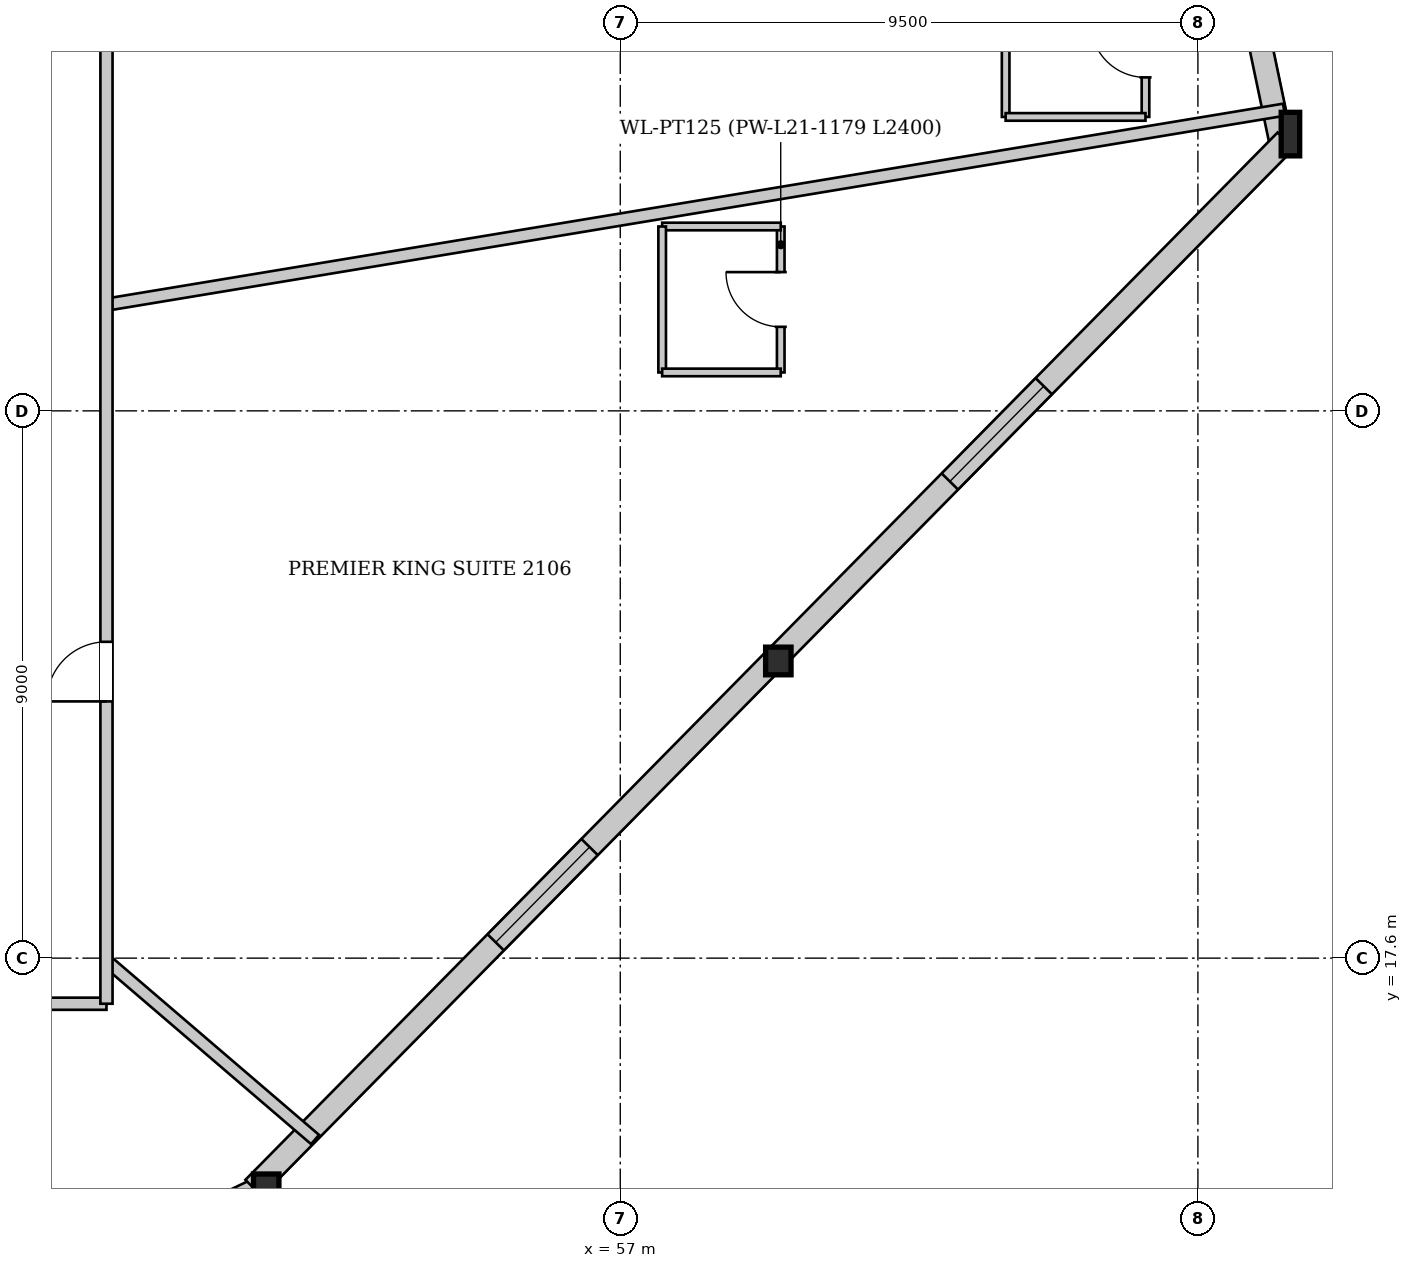
"""IFC4 building model, lengths in metres.
Left out: names, types, materials, properties, quantities, classifications, styles, units other than length and angle.
Written with IfcOpenShell. Run it as: python <this file> out.ifc"""

import sys

from ifc_helpers import new_model, si_unit, direction, frame, frame_2d, origin, origin_2d, place, context, subcontext, project, spatial, rectangle, i_section, extrude, source, transform, mapped, element, fill, save


model = new_model("IFC4")
c1 = context("Model", 3, precision=1e-05, world=origin(), true_north=direction((0.0, 1.0)))
c2 = subcontext(c1, "Body", "Model", "MODEL_VIEW")
j1 = project(units=[si_unit("LENGTHUNIT", "METRE"), si_unit("PLANEANGLEUNIT", "RADIAN")], contexts=[c1])
p1 = place(None, origin())
s1 = spatial("IfcSite", under=j1, at=p1, CompositionType="ELEMENT")
p2 = place(p1, origin())
s2 = spatial("IfcBuilding", under=s1, at=p2, CompositionType="ELEMENT")
p3 = place(p2, frame((0.0, 0.0, 84.4)))
s3 = spatial("IfcBuildingStorey", under=s2, at=p3, CompositionType="ELEMENT", Elevation=84.4)
m1 = source(origin(), c2, "Body", "SweptSolid", [
    extrude(i_section(OverallWidth=0.304, OverallDepth=0.716, WebThickness=0.021, FlangeThickness=0.04, at=origin_2d()), origin(), (0.0, 0.0, 1.0), 3.421),
])
p4 = place(p3, frame((68.081, 30.911, 0.0), z_axis=(-0.034755185422, 0.140376693481, 0.989487979216), x_axis=(-0.970691537398, -0.240328814801, 0.0)))
e1 = element("IfcColumn", 1, at=p4, inside=s3, PredefinedType="COLUMN", context=c2, shape_type="MappedRepresentation", body=[
    mapped(m1, transform((0.0, 0.0, 0.0), x_axis=(1.0, 0.0, 0.0), y_axis=(0.0, 1.0, 0.0), z_axis=(0.0, 0.0, 1.0), scale=1.0)),
])
m2 = source(origin(), c2, "Body", "SweptSolid", [
    extrude(i_section(OverallWidth=0.418, OverallDepth=0.455, WebThickness=0.038, FlangeThickness=0.059, at=origin_2d()), origin(), (0.0, 0.0, 1.0), 3.399),
])
p5 = place(p3, frame((51.105, 13.687, 0.0), z_axis=(0.042450582005, 0.079873176293, 0.995900709808), x_axis=(-0.883033453869, 0.469310046076, 0.0)))
e2 = element("IfcColumn", 2, at=p5, inside=s3, PredefinedType="COLUMN", context=c2, shape_type="MappedRepresentation", body=[
    mapped(m2, transform((0.0, 0.0, 0.0), x_axis=(1.0, 0.0, 0.0), y_axis=(0.0, 1.0, 0.0), z_axis=(0.0, 0.0, 1.0), scale=1.0)),
])
m3 = source(origin(), c2, "Body", "SweptSolid", [
    extrude(i_section(OverallWidth=0.418, OverallDepth=0.455, WebThickness=0.038, FlangeThickness=0.059, at=origin_2d()), origin(), (0.0, 0.0, 1.0), 3.406),
])
p6 = place(p3, frame((59.593, 22.299, 0.0), z_axis=(0.003727502518, 0.110391420713, 0.993881200123), x_axis=(-0.999430407751, 0.033747000781, 0.0)))
e3 = element("IfcColumn", 3, at=p6, inside=s3, PredefinedType="COLUMN", context=c2, shape_type="MappedRepresentation", body=[
    mapped(m3, transform((0.0, 0.0, 0.0), x_axis=(1.0, 0.0, 0.0), y_axis=(0.0, 1.0, 0.0), z_axis=(0.0, 0.0, 1.0), scale=1.0)),
])
p7 = place(p3, frame((51.036, 13.831, 0.0), z_axis=(0.0, 0.0, 1.0), x_axis=(-0.901204126569, -0.433394880283, 0.0)))
e4 = element("IfcWall", 4, at=p7, inside=s3, PredefinedType="SOLIDWALL", context=c2, shape_type="SweptSolid", body=[
    extrude(rectangle(XDim=24.184, YDim=0.32, at=frame_2d((12.092, 0.0))), origin(), (0.0, 0.0, 1.0), 2.692),
])
p8 = place(p7, frame((7.189, 0.0, 0.0)))
e5 = element("IfcOpeningElement", 5, at=p8, cuts=e4, PredefinedType="OPENING", context=c2, shape_type="SweptSolid", body=[
    extrude(rectangle(XDim=1.1, YDim=2.3, at=frame_2d((0.55, 1.15))), frame((0.0, 0.17, 0.0), z_axis=(0.0, -1.0, 0.0), x_axis=(1.0, 0.0, 0.0)), (0.0, 0.0, 1.0), 0.34),
])
p9 = place(p7, frame((17.746, 0.0, 0.372)))
e6 = element("IfcOpeningElement", 6, at=p9, cuts=e4, PredefinedType="OPENING", context=c2, shape_type="SweptSolid", body=[
    extrude(rectangle(XDim=1.8, YDim=2.2, at=frame_2d((0.9, 1.1))), frame((0.0, 0.17, 0.0), z_axis=(0.0, -1.0, 0.0), x_axis=(1.0, 0.0, 0.0)), (0.0, 0.0, 1.0), 0.34),
])
p10 = place(p3, frame((67.023, 35.03, 0.0), z_axis=(0.0, 0.0, 1.0), x_axis=(0.205390638941, -0.978680073076, 0.0)))
e7 = element("IfcWall", 7, at=p10, inside=s3, PredefinedType="SOLIDWALL", context=c2, shape_type="SweptSolid", body=[
    extrude(rectangle(XDim=4.248, YDim=0.38, at=frame_2d((2.124, 0.0))), origin(), (0.0, 0.0, 1.0), 2.692),
])
p11 = place(p3, frame((67.946, 31.045, 0.0), z_axis=(0.0, 0.0, 1.0), x_axis=(-0.701949653056, -0.712226568288, 0.0)))
e8 = element("IfcWall", 8, at=p11, inside=s3, PredefinedType="SOLIDWALL", context=c2, shape_type="SweptSolid", body=[
    extrude(rectangle(XDim=24.184, YDim=0.38, at=frame_2d((12.092, 0.0))), origin(), (0.0, 0.0, 1.0), 2.692),
])
p12 = place(p11, frame((5.671, 0.0, 0.322)))
e9 = element("IfcOpeningElement", 9, at=p12, cuts=e8, PredefinedType="OPENING", context=c2, shape_type="SweptSolid", body=[
    extrude(rectangle(XDim=2.2, YDim=2.25, at=frame_2d((1.1, 1.125))), frame((0.0, 0.2, 0.0), z_axis=(0.0, -1.0, 0.0), x_axis=(1.0, 0.0, 0.0)), (0.0, 0.0, 1.0), 0.4),
])
p13 = place(p11, frame((16.312, 0.0, 0.322)))
e10 = element("IfcOpeningElement", 10, at=p13, cuts=e8, PredefinedType="OPENING", context=c2, shape_type="SweptSolid", body=[
    extrude(rectangle(XDim=2.2, YDim=2.25, at=frame_2d((1.1, 1.125))), frame((0.0, 0.2, 0.0), z_axis=(0.0, -1.0, 0.0), x_axis=(1.0, 0.0, 0.0)), (0.0, 0.0, 1.0), 0.4),
])
p14 = place(p3, frame((48.55, 17.558, 0.0), z_axis=(0.0, 0.0, 1.0), x_axis=(0.75925278781, -0.650795823744, 0.0)))
e11 = element("IfcWall", 11, at=p14, inside=s3, PredefinedType="PARTITIONING", context=c2, shape_type="SweptSolid", body=[
    extrude(rectangle(XDim=4.518, YDim=0.2, at=frame_2d((2.259, 0.0))), origin(), (0.0, 0.0, 1.0), 3.3),
])
p15 = place(p3, frame((48.55, 28.346, 0.0), z_axis=(0.0, 0.0, 1.0), x_axis=(0.986571835932, 0.163327929471, 0.0)))
e12 = element("IfcWall", 12, at=p15, inside=s3, PredefinedType="PARTITIONING", context=c2, shape_type="SweptSolid", body=[
    extrude(rectangle(XDim=19.63, YDim=0.2, at=frame_2d((9.815, 0.0))), origin(), (0.0, 0.0, 1.0), 2.795),
])
p16 = place(p3, frame((59.639, 27.232, 0.0), z_axis=(0.0, 0.0, 1.0), x_axis=(0.0, 1.0, 0.0)))
e13 = element("IfcWall", 13, at=p16, inside=s3, PredefinedType="PARTITIONING", context=c2, shape_type="SweptSolid", body=[
    extrude(rectangle(XDim=2.4, YDim=0.125, at=frame_2d((1.2, 0.0))), origin(), (0.0, 0.0, 1.0), 3.3),
])
p17 = place(p16, frame((0.75, 0.0, 0.0)))
e14 = element("IfcOpeningElement", 14, at=p17, cuts=e13, PredefinedType="OPENING", context=c2, shape_type="SweptSolid", body=[
    extrude(rectangle(XDim=0.9, YDim=2.1, at=frame_2d((0.45, 1.05))), frame((0.0, 0.073, 0.0), z_axis=(0.0, -1.0, 0.0), x_axis=(1.0, 0.0, 0.0)), (0.0, 0.0, 1.0), 0.145),
])
p18 = place(p3, frame((59.639, 29.632, 0.0), z_axis=(0.0, 0.0, 1.0), x_axis=(-1.0, 0.0, 0.0)))
e15 = element("IfcWall", 15, at=p18, inside=s3, PredefinedType="PARTITIONING", context=c2, shape_type="SweptSolid", body=[
    extrude(rectangle(XDim=1.95, YDim=0.125, at=frame_2d((0.975, 0.0))), origin(), (0.0, 0.0, 1.0), 2.795),
])
p19 = place(p3, frame((57.689, 29.632, 0.0), z_axis=(0.0, 0.0, 1.0), x_axis=(0.0, -1.0, 0.0)))
e16 = element("IfcWall", 16, at=p19, inside=s3, PredefinedType="PARTITIONING", context=c2, shape_type="SweptSolid", body=[
    extrude(rectangle(XDim=2.4, YDim=0.125, at=frame_2d((1.2, 0.0))), origin(), (0.0, 0.0, 1.0), 3.3),
])
p20 = place(p3, frame((57.689, 27.232, 0.0), z_axis=(0.0, 0.0, 1.0), x_axis=(1.0, 0.0, 0.0)))
e17 = element("IfcWall", 17, at=p20, inside=s3, PredefinedType="PARTITIONING", context=c2, shape_type="SweptSolid", body=[
    extrude(rectangle(XDim=1.95, YDim=0.125, at=frame_2d((0.975, 0.0))), origin(), (0.0, 0.0, 1.0), 3.3),
])
p21 = place(p3, frame((65.638, 31.434, 0.0), z_axis=(0.0, 0.0, 1.0), x_axis=(0.0, 1.0, 0.0)))
e18 = element("IfcWall", 18, at=p21, inside=s3, PredefinedType="PARTITIONING", context=c2, shape_type="SweptSolid", body=[
    extrude(rectangle(XDim=2.2, YDim=0.125, at=frame_2d((1.1, 0.0))), origin(), (0.0, 0.0, 1.0), 3.3),
])
p22 = place(p21, frame((0.65, 0.0, 0.0)))
e19 = element("IfcOpeningElement", 19, at=p22, cuts=e18, PredefinedType="OPENING", context=c2, shape_type="SweptSolid", body=[
    extrude(rectangle(XDim=0.9, YDim=2.1, at=frame_2d((0.45, 1.05))), frame((0.0, 0.073, 0.0), z_axis=(0.0, -1.0, 0.0), x_axis=(1.0, 0.0, 0.0)), (0.0, 0.0, 1.0), 0.145),
])
p23 = place(p3, frame((63.338, 33.634, 0.0), z_axis=(0.0, 0.0, 1.0), x_axis=(0.0, -1.0, 0.0)))
e20 = element("IfcWall", 20, at=p23, inside=s3, PredefinedType="PARTITIONING", context=c2, shape_type="SweptSolid", body=[
    extrude(rectangle(XDim=2.2, YDim=0.125, at=frame_2d((1.1, 0.0))), origin(), (0.0, 0.0, 1.0), 3.3),
])
p24 = place(p3, frame((63.338, 31.434, 0.0), z_axis=(0.0, 0.0, 1.0), x_axis=(1.0, 0.0, 0.0)))
e21 = element("IfcWall", 21, at=p24, inside=s3, PredefinedType="PARTITIONING", context=c2, shape_type="SweptSolid", body=[
    extrude(rectangle(XDim=2.3, YDim=0.125, at=frame_2d((1.15, 0.0))), origin(), (0.0, 0.0, 1.0), 3.3),
])
p25 = place(p3, frame((27.45, 16.85, 0.0), z_axis=(0.0, 0.0, 1.0), x_axis=(1.0, 0.0, 0.0)))
e22 = element("IfcWall", 22, at=p25, inside=s3, PredefinedType="PARTITIONING", context=c2, shape_type="SweptSolid", body=[
    extrude(rectangle(XDim=21.1, YDim=0.2, at=frame_2d((10.55, 0.0))), origin(), (0.0, 0.0, 1.0), 3.3),
])
p26 = place(p25, frame((1.399, 0.0, 0.0)))
e23 = element("IfcOpeningElement", 23, at=p26, cuts=e22, PredefinedType="OPENING", context=c2, shape_type="SweptSolid", body=[
    extrude(rectangle(XDim=0.98, YDim=2.15, at=frame_2d((0.49, 1.075))), frame((0.0, 0.11, 0.0), z_axis=(0.0, -1.0, 0.0), x_axis=(1.0, 0.0, 0.0)), (0.0, 0.0, 1.0), 0.22),
])
p27 = place(p25, frame((11.767, 0.0, 0.0)))
e24 = element("IfcOpeningElement", 24, at=p27, cuts=e22, PredefinedType="OPENING", context=c2, shape_type="SweptSolid", body=[
    extrude(rectangle(XDim=0.98, YDim=2.15, at=frame_2d((0.49, 1.075))), frame((0.0, 0.11, 0.0), z_axis=(0.0, -1.0, 0.0), x_axis=(1.0, 0.0, 0.0)), (0.0, 0.0, 1.0), 0.22),
])
p28 = place(p3, frame((48.55, 16.85, 0.0), z_axis=(0.0, 0.0, 1.0), x_axis=(0.0, 1.0, 0.0)))
e25 = element("IfcWall", 25, at=p28, inside=s3, PredefinedType="PARTITIONING", context=c2, shape_type="SweptSolid", body=[
    extrude(rectangle(XDim=19.5, YDim=0.2, at=frame_2d((9.75, 0.0))), origin(), (0.0, 0.0, 1.0), 3.3),
])
p29 = place(p28, frame((4.972, 0.0, 0.0)))
e26 = element("IfcOpeningElement", 26, at=p29, cuts=e25, PredefinedType="OPENING", context=c2, shape_type="SweptSolid", body=[
    extrude(rectangle(XDim=0.98, YDim=2.15, at=frame_2d((0.49, 1.075))), frame((0.0, 0.11, 0.0), z_axis=(0.0, -1.0, 0.0), x_axis=(1.0, 0.0, 0.0)), (0.0, 0.0, 1.0), 0.22),
])
m4 = source(origin(), c2, "Body", "SweptSolid", [
    extrude(rectangle(XDim=2.2, YDim=2.25, at=frame_2d((1.1, 1.125))), frame((0.0, 0.03, 0.0), z_axis=(0.0, -1.0, 0.0), x_axis=(1.0, 0.0, 0.0)), (0.0, 0.0, 1.0), 0.06),
])
p30 = place(p12, origin())
e27 = element("IfcWindow", 27, at=p30, inside=s3, PartitioningType="SINGLE_PANEL", PredefinedType="WINDOW", context=c2, shape_type="MappedRepresentation", body=[
    mapped(m4, transform((0.0, 0.0, 0.0), x_axis=(1.0, 0.0, 0.0), y_axis=(0.0, 1.0, 0.0), z_axis=(0.0, 0.0, 1.0), scale=1.0)),
])
fill(e9, e27)
p31 = place(p13, origin())
e28 = element("IfcWindow", 28, at=p31, inside=s3, PartitioningType="SINGLE_PANEL", PredefinedType="WINDOW", context=c2, shape_type="MappedRepresentation", body=[
    mapped(m4, transform((0.0, 0.0, 0.0), x_axis=(1.0, 0.0, 0.0), y_axis=(0.0, 1.0, 0.0), z_axis=(0.0, 0.0, 1.0), scale=1.0)),
])
fill(e10, e28)
m5 = source(origin(), c2, "Body", "SweptSolid", [
    extrude(rectangle(XDim=0.9, YDim=2.1, at=frame_2d((0.45, 1.05))), frame((0.0, 0.025, 0.0), z_axis=(0.0, -1.0, 0.0), x_axis=(1.0, 0.0, 0.0)), (0.0, 0.0, 1.0), 0.05),
])
p32 = place(p17, origin())
e29 = element("IfcDoor", 29, at=p32, inside=s3, OperationType="SINGLE_SWING_RIGHT", PredefinedType="DOOR", context=c2, shape_type="MappedRepresentation", body=[
    mapped(m5, transform((0.0, 0.0, 0.0), x_axis=(1.0, 0.0, 0.0), y_axis=(0.0, 1.0, 0.0), z_axis=(0.0, 0.0, 1.0), scale=1.0)),
])
fill(e14, e29)
p33 = place(p22, origin())
e30 = element("IfcDoor", 30, at=p33, inside=s3, OperationType="SINGLE_SWING_RIGHT", PredefinedType="DOOR", context=c2, shape_type="MappedRepresentation", body=[
    mapped(m5, transform((0.0, 0.0, 0.0), x_axis=(1.0, 0.0, 0.0), y_axis=(0.0, 1.0, 0.0), z_axis=(0.0, 0.0, 1.0), scale=1.0)),
])
fill(e19, e30)
m6 = source(origin(), c2, "Body", "SweptSolid", [
    extrude(rectangle(XDim=0.98, YDim=2.15, at=frame_2d((0.49, 1.075))), frame((0.0, 0.025, 0.0), z_axis=(0.0, -1.0, 0.0), x_axis=(1.0, 0.0, 0.0)), (0.0, 0.0, 1.0), 0.05),
])
p34 = place(p29, origin())
e31 = element("IfcDoor", 31, at=p34, inside=s3, OperationType="SINGLE_SWING_LEFT", PredefinedType="DOOR", context=c2, shape_type="MappedRepresentation", body=[
    mapped(m6, transform((0.0, 0.0, 0.0), x_axis=(1.0, 0.0, 0.0), y_axis=(0.0, 1.0, 0.0), z_axis=(0.0, 0.0, 1.0), scale=1.0)),
])
fill(e26, e31)
save(model, sys.argv[1])
